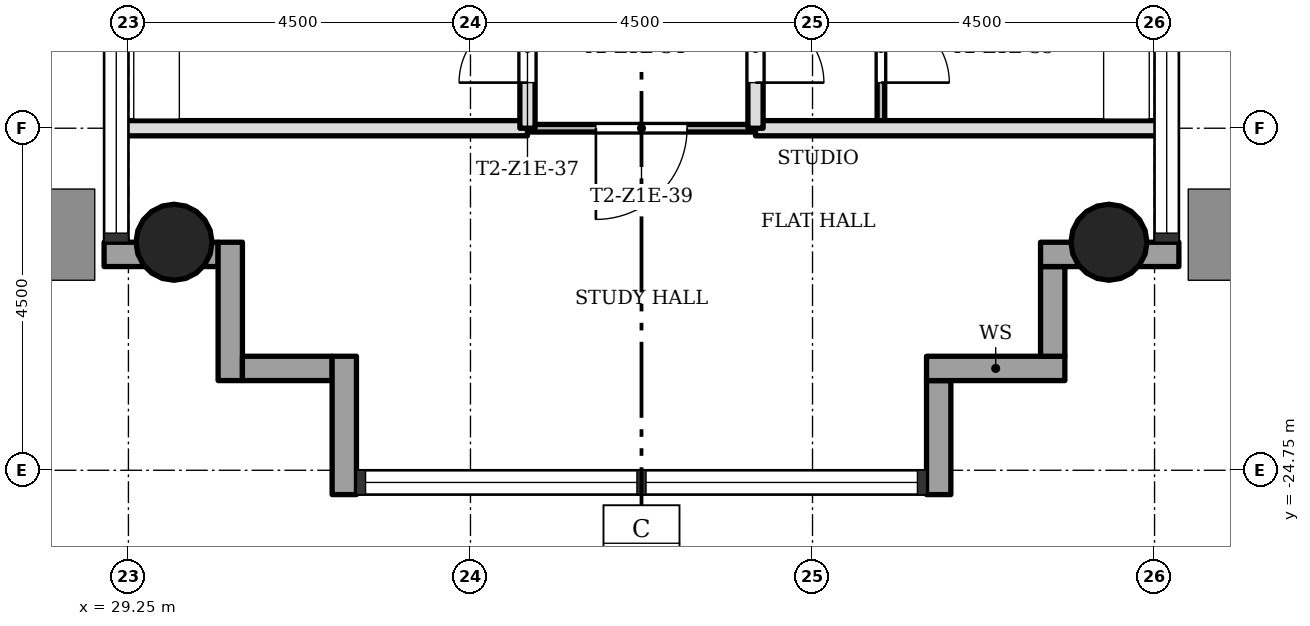
"""IFC4 building model, lengths in metres.
Left out: names, types, materials, properties, quantities, classifications, styles, units other than length and angle.
Written with IfcOpenShell. Run it as: python <this file> out.ifc"""

import sys

from ifc_helpers import new_model, si_unit, direction, frame, frame_2d, origin, origin_2d, place, context, subcontext, project, spatial, rectangle, hollow_circle, extrude, element, fill, save


model = new_model("IFC4")
c1 = context("Model", 3, precision=1e-05, world=origin(), true_north=direction((0.0, 1.0)))
c2 = subcontext(c1, "Body", "Model", "MODEL_VIEW")
j1 = project(units=[si_unit("LENGTHUNIT", "METRE"), si_unit("PLANEANGLEUNIT", "RADIAN")], contexts=[c1])
p1 = place(None, origin())
s1 = spatial("IfcSite", under=j1, at=p1, CompositionType="ELEMENT")
p2 = place(p1, origin())
s2 = spatial("IfcBuilding", under=s1, at=p2, CompositionType="ELEMENT")
p3 = place(p2, frame((0.0, 0.0, 65.3)))
s3 = spatial("IfcBuildingStorey", under=s2, at=p3, CompositionType="ELEMENT", Elevation=65.3)
for number, where, z_axis, x_axis in (
    (1, (42.15, -21.75, 0.0), (0.0, 0.0, 1.0), (1.0, 0.0, 0.0)),
    (2, (29.85, -21.75, 0.0), (0.0, 0.0, 1.0), (1.0, 0.0, 0.0)),
):
    element("IfcColumn", number, at=place(p3, frame(where, z_axis=z_axis, x_axis=x_axis)), inside=s3, PredefinedType="COLUMN", context=c2, shape_type="SweptSolid", body=[
        extrude(hollow_circle(Radius=0.5, WallThickness=0.036, at=origin_2d()), origin(), (0.0, 0.0, 1.0), 3.4),
    ])
p4 = place(p3, frame((39.91, -25.07, -0.3), z_axis=(0.0, 0.0, 1.0), x_axis=(0.0, 1.0, 0.0)))
e3 = element("IfcWall", 3, at=p4, inside=s3, PredefinedType="STANDARD", context=c2, shape_type="SweptSolid", body=[
    extrude(rectangle(XDim=1.5, YDim=0.32, at=frame_2d((0.75, 0.0))), origin(), (0.0, 0.0, 1.0), 3.4),
])
p5 = place(p3, frame((39.75, -23.41, -0.3), z_axis=(0.0, 0.0, 1.0), x_axis=(1.0, 0.0, 0.0)))
e4 = element("IfcWall", 4, at=p5, inside=s3, PredefinedType="STANDARD", context=c2, shape_type="SweptSolid", body=[
    extrude(rectangle(XDim=1.82, YDim=0.32, at=frame_2d((0.91, 0.0))), origin(), (0.0, 0.0, 1.0), 3.4),
])
p6 = place(p3, frame((41.41, -23.25, -0.3), z_axis=(0.0, 0.0, 1.0), x_axis=(0.0, 1.0, 0.0)))
e5 = element("IfcWall", 5, at=p6, inside=s3, PredefinedType="STANDARD", context=c2, shape_type="SweptSolid", body=[
    extrude(rectangle(XDim=1.18, YDim=0.32, at=frame_2d((0.59, 0.0))), origin(), (0.0, 0.0, 1.0), 3.4),
])
p7 = place(p3, frame((41.25, -21.91, -0.3), z_axis=(0.0, 0.0, 1.0), x_axis=(1.0, 0.0, 0.0)))
e6 = element("IfcWall", 6, at=p7, inside=s3, PredefinedType="STANDARD", context=c2, shape_type="SweptSolid", body=[
    extrude(rectangle(XDim=1.82, YDim=0.32, at=frame_2d((0.91, 0.0))), origin(), (0.0, 0.0, 1.0), 3.4),
])
p8 = place(p3, frame((28.93, -21.91, -0.3), z_axis=(0.0, 0.0, 1.0), x_axis=(1.0, 0.0, 0.0)))
e7 = element("IfcWall", 7, at=p8, inside=s3, PredefinedType="STANDARD", context=c2, shape_type="SweptSolid", body=[
    extrude(rectangle(XDim=1.5, YDim=0.32, at=frame_2d((0.75, 0.0))), origin(), (0.0, 0.0, 1.0), 3.4),
])
p9 = place(p3, frame((30.59, -21.75, -0.3), z_axis=(0.0, 0.0, 1.0), x_axis=(0.0, -1.0, 0.0)))
e8 = element("IfcWall", 8, at=p9, inside=s3, PredefinedType="STANDARD", context=c2, shape_type="SweptSolid", body=[
    extrude(rectangle(XDim=1.82, YDim=0.32, at=frame_2d((0.91, 0.0))), origin(), (0.0, 0.0, 1.0), 3.4),
])
p10 = place(p3, frame((30.75, -23.41, -0.3), z_axis=(0.0, 0.0, 1.0), x_axis=(1.0, 0.0, 0.0)))
e9 = element("IfcWall", 9, at=p10, inside=s3, PredefinedType="STANDARD", context=c2, shape_type="SweptSolid", body=[
    extrude(rectangle(XDim=1.18, YDim=0.32, at=frame_2d((0.59, 0.0))), origin(), (0.0, 0.0, 1.0), 3.4),
])
p11 = place(p3, frame((32.09, -23.25, -0.3), z_axis=(0.0, 0.0, 1.0), x_axis=(0.0, -1.0, 0.0)))
e10 = element("IfcWall", 10, at=p11, inside=s3, PredefinedType="STANDARD", context=c2, shape_type="SweptSolid", body=[
    extrude(rectangle(XDim=1.82, YDim=0.32, at=frame_2d((0.91, 0.0))), origin(), (0.0, 0.0, 1.0), 3.4),
])
p12 = place(p3, frame((37.5, -20.25, 0.0), z_axis=(0.0, 0.0, 1.0), x_axis=(-1.0, 0.0, 0.0)))
e11 = element("IfcWall", 11, at=p12, inside=s3, PredefinedType="PARTITIONING", context=c2, shape_type="SweptSolid", body=[
    extrude(rectangle(XDim=3.0, YDim=0.1, at=frame_2d((1.5, 0.0))), origin(), (0.0, 0.0, 1.0), 3.0),
])
p13 = place(p12, frame((0.9, 0.0, 0.0)))
e12 = element("IfcOpeningElement", 12, at=p13, cuts=e11, PredefinedType="OPENING", context=c2, shape_type="SweptSolid", body=[
    extrude(rectangle(XDim=1.2, YDim=2.1, at=frame_2d((0.6, 1.05))), frame((0.0, 0.06, 0.0), z_axis=(0.0, -1.0, 0.0), x_axis=(1.0, 0.0, 0.0)), (0.0, 0.0, 1.0), 0.12),
])
for number, where, z_axis, x_axis in (
    (13, (42.85, -20.25, 0.0), (0.0, 0.0, 1.0), (-1.0, 0.0, 0.0)),
    (14, (34.5, -20.25, 0.0), (0.0, 0.0, 1.0), (-1.0, 0.0, 0.0)),
):
    element("IfcWall", number, at=place(p3, frame(where, z_axis=z_axis, x_axis=x_axis)), inside=s3, PredefinedType="SOLIDWALL", context=c2, shape_type="SweptSolid", body=[
        extrude(rectangle(XDim=5.35, YDim=0.2, at=frame_2d((2.675, 0.0))), origin(), (0.0, 0.0, 1.0), 3.0),
    ])
p14 = place(p3, frame((39.15, -20.25, 0.0), z_axis=(0.0, 0.0, 1.0), x_axis=(0.0, 1.0, 0.0)))
e15 = element("IfcWall", 15, at=p14, inside=s3, PredefinedType="PARTITIONING", context=c2, shape_type="SweptSolid", body=[
    extrude(rectangle(XDim=4.5, YDim=0.1, at=frame_2d((2.25, 0.0))), origin(), (0.0, 0.0, 1.0), 3.0),
])
p15 = place(p14, frame((0.6, 0.0, 0.0)))
e16 = element("IfcOpeningElement", 16, at=p15, cuts=e15, PredefinedType="OPENING", context=c2, shape_type="SweptSolid", body=[
    extrude(rectangle(XDim=0.9, YDim=2.1, at=frame_2d((0.45, 1.05))), frame((0.0, 0.06, 0.0), z_axis=(0.0, -1.0, 0.0), x_axis=(1.0, 0.0, 0.0)), (0.0, 0.0, 1.0), 0.12),
])
p16 = place(p3, frame((37.5, -20.25, 0.0), z_axis=(0.0, 0.0, 1.0), x_axis=(0.0, 1.0, 0.0)))
e17 = element("IfcWall", 17, at=p16, inside=s3, PredefinedType="SOLIDWALL", context=c2, shape_type="SweptSolid", body=[
    extrude(rectangle(XDim=4.5, YDim=0.2, at=frame_2d((2.25, 0.0))), origin(), (0.0, 0.0, 1.0), 3.0),
])
p17 = place(p16, frame((0.6, 0.0, 0.0)))
e18 = element("IfcOpeningElement", 18, at=p17, cuts=e17, PredefinedType="OPENING", context=c2, shape_type="SweptSolid", body=[
    extrude(rectangle(XDim=0.9, YDim=2.1, at=frame_2d((0.45, 1.05))), frame((0.0, 0.11, 0.0), z_axis=(0.0, -1.0, 0.0), x_axis=(1.0, 0.0, 0.0)), (0.0, 0.0, 1.0), 0.22),
])
p18 = place(p3, frame((34.5, -20.25, 0.0), z_axis=(0.0, 0.0, 1.0), x_axis=(0.0, 1.0, 0.0)))
e19 = element("IfcWall", 19, at=p18, inside=s3, PredefinedType="SOLIDWALL", context=c2, shape_type="SweptSolid", body=[
    extrude(rectangle(XDim=4.5, YDim=0.2, at=frame_2d((2.25, 0.0))), origin(), (0.0, 0.0, 1.0), 3.0),
])
p19 = place(p18, frame((0.6, 0.0, 0.0)))
e20 = element("IfcOpeningElement", 20, at=p19, cuts=e19, PredefinedType="OPENING", context=c2, shape_type="SweptSolid", body=[
    extrude(rectangle(XDim=0.9, YDim=2.1, at=frame_2d((0.45, 1.05))), frame((0.0, 0.11, 0.0), z_axis=(0.0, -1.0, 0.0), x_axis=(1.0, 0.0, 0.0)), (0.0, 0.0, 1.0), 0.22),
])
p20 = place(p17, origin())
e21 = element("IfcDoor", 21, at=p20, inside=s3, OperationType="SINGLE_SWING_LEFT", PredefinedType="DOOR", context=c2, shape_type="SweptSolid", body=[
    extrude(rectangle(XDim=0.9, YDim=2.1, at=frame_2d((0.45, 1.05))), frame((0.0, 0.025, 0.0), z_axis=(0.0, -1.0, 0.0), x_axis=(1.0, 0.0, 0.0)), (0.0, 0.0, 1.0), 0.05),
])
fill(e18, e21)
p21 = place(p15, origin())
e22 = element("IfcDoor", 22, at=p21, inside=s3, OperationType="SINGLE_SWING_LEFT", PredefinedType="DOOR", context=c2, shape_type="SweptSolid", body=[
    extrude(rectangle(XDim=0.9, YDim=2.1, at=frame_2d((0.45, 1.05))), frame((0.0, 0.025, 0.0), z_axis=(0.0, -1.0, 0.0), x_axis=(1.0, 0.0, 0.0)), (0.0, 0.0, 1.0), 0.05),
])
fill(e16, e22)
p22 = place(p19, origin())
e23 = element("IfcDoor", 23, at=p22, inside=s3, OperationType="SINGLE_SWING_RIGHT", PredefinedType="DOOR", context=c2, shape_type="SweptSolid", body=[
    extrude(rectangle(XDim=0.9, YDim=2.1, at=frame_2d((0.45, 1.05))), frame((0.0, 0.025, 0.0), z_axis=(0.0, -1.0, 0.0), x_axis=(1.0, 0.0, 0.0)), (0.0, 0.0, 1.0), 0.05),
])
fill(e20, e23)
p23 = place(p13, origin())
e24 = element("IfcDoor", 24, at=p23, inside=s3, OperationType="SINGLE_SWING_LEFT", PredefinedType="DOOR", context=c2, shape_type="SweptSolid", body=[
    extrude(rectangle(XDim=1.2, YDim=2.1, at=frame_2d((0.6, 1.05))), frame((0.0, 0.025, 0.0), z_axis=(0.0, -1.0, 0.0), x_axis=(1.0, 0.0, 0.0)), (0.0, 0.0, 1.0), 0.05),
])
fill(e12, e24)
save(model, sys.argv[1])
